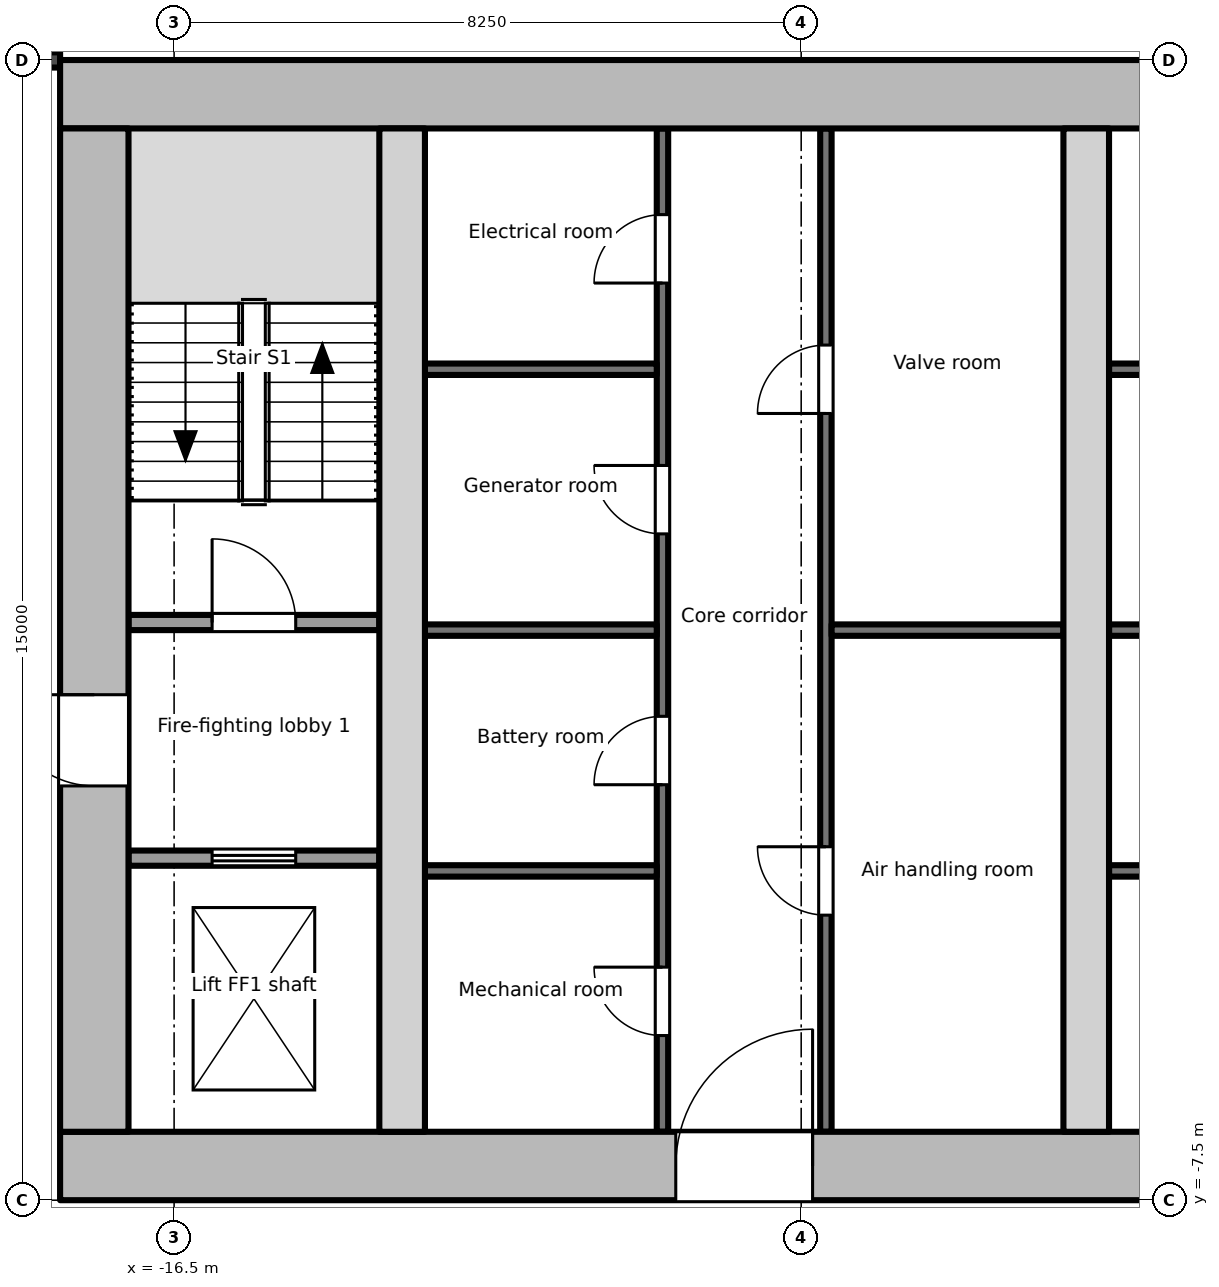
"""IFC4 building model, lengths in metres.
Left out: names, types, materials, properties, quantities, classifications, styles, units other than length and angle.
Written with IfcOpenShell. Run it as: python <this file> out.ifc"""

import sys

from ifc_helpers import new_model, si_unit, direction, frame, frame_2d, origin, place, context, subcontext, project, spatial, rectangle, extrude, element, fill, save


model = new_model("IFC4")
c1 = context("Model", 3, precision=1e-05, world=origin(), true_north=direction((0.0, 1.0)))
c2 = subcontext(c1, "Body", "Model", "MODEL_VIEW")
j1 = project(units=[si_unit("LENGTHUNIT", "METRE"), si_unit("PLANEANGLEUNIT", "RADIAN")], contexts=[c1])
p1 = place(None, origin())
s1 = spatial("IfcSite", under=j1, at=p1, CompositionType="ELEMENT")
p2 = place(p1, origin())
s2 = spatial("IfcBuilding", under=s1, at=p2, CompositionType="ELEMENT")
p3 = place(p2, frame((0.0, 0.0, 308.3)))
s3 = spatial("IfcBuildingStorey", under=s2, at=p3, CompositionType="ELEMENT", Elevation=308.3)
p4 = place(p3, frame((-18.0, -7.05, -0.2), z_axis=(0.0, 0.0, 1.0), x_axis=(1.0, 0.0, 0.0)))
e1 = element("IfcWall", 1, at=p4, inside=s3, PredefinedType="SHEAR", context=c2, shape_type="SweptSolid", body=[
    extrude(rectangle(XDim=36.0, YDim=0.9, at=frame_2d((18.0, 0.0))), origin(), (0.0, 0.0, 1.0), 4.0),
])
p5 = place(p4, frame((8.1, 0.0, 0.2)))
e2 = element("IfcOpeningElement", 2, at=p5, cuts=e1, PredefinedType="OPENING", context=c2, shape_type="SweptSolid", body=[
    extrude(rectangle(XDim=1.8, YDim=2.1, at=frame_2d((0.9, 1.05))), frame((0.0, 0.46, 0.0), z_axis=(0.0, -1.0, 0.0), x_axis=(1.0, 0.0, 0.0)), (0.0, 0.0, 1.0), 0.921),
])
p6 = place(p4, frame((17.1, 0.0, 0.2)))
e3 = element("IfcOpeningElement", 3, at=p6, cuts=e1, PredefinedType="OPENING", context=c2, shape_type="SweptSolid", body=[
    extrude(rectangle(XDim=1.8, YDim=2.1, at=frame_2d((0.9, 1.05))), frame((0.0, 0.46, 0.0), z_axis=(0.0, -1.0, 0.0), x_axis=(1.0, 0.0, 0.0)), (0.0, 0.0, 1.0), 0.921),
])
p7 = place(p4, frame((26.1, 0.0, 0.2)))
e4 = element("IfcOpeningElement", 4, at=p7, cuts=e1, PredefinedType="OPENING", context=c2, shape_type="SweptSolid", body=[
    extrude(rectangle(XDim=1.8, YDim=2.1, at=frame_2d((0.9, 1.05))), frame((0.0, 0.46, 0.0), z_axis=(0.0, -1.0, 0.0), x_axis=(1.0, 0.0, 0.0)), (0.0, 0.0, 1.0), 0.921),
])
p8 = place(p3, frame((-18.0, 7.05, -0.2), z_axis=(0.0, 0.0, 1.0), x_axis=(1.0, 0.0, 0.0)))
e5 = element("IfcWall", 5, at=p8, inside=s3, PredefinedType="SHEAR", context=c2, shape_type="SweptSolid", body=[
    extrude(rectangle(XDim=36.0, YDim=0.9, at=frame_2d((18.0, 0.0))), origin(), (0.0, 0.0, 1.0), 4.0),
])
p9 = place(p3, frame((-17.55, -6.6, -0.2), z_axis=(0.0, 0.0, 1.0), x_axis=(0.0, 1.0, 0.0)))
e6 = element("IfcWall", 6, at=p9, inside=s3, PredefinedType="SHEAR", context=c2, shape_type="SweptSolid", body=[
    extrude(rectangle(XDim=13.2, YDim=0.9, at=frame_2d((6.6, 0.0))), origin(), (0.0, 0.0, 1.0), 4.0),
])
p10 = place(p9, frame((4.55, 0.0, 0.2)))
e7 = element("IfcOpeningElement", 7, at=p10, cuts=e6, PredefinedType="OPENING", context=c2, shape_type="SweptSolid", body=[
    extrude(rectangle(XDim=1.2, YDim=2.1, at=frame_2d((0.6, 1.05))), frame((0.0, 0.46, 0.0), z_axis=(0.0, -1.0, 0.0), x_axis=(1.0, 0.0, 0.0)), (0.0, 0.0, 1.0), 0.921),
])
for number, where, z_axis, x_axis in (
    (8, (-13.5, -6.6, -0.2), (0.0, 0.0, 1.0), (0.0, 1.0, 0.0)),
    (9, (-4.5, -6.6, -0.2), (0.0, 0.0, 1.0), (0.0, 1.0, 0.0)),
):
    element("IfcWall", number, at=place(p3, frame(where, z_axis=z_axis, x_axis=x_axis)), inside=s3, PredefinedType="SHEAR", context=c2, shape_type="SweptSolid", body=[
        extrude(rectangle(XDim=13.2, YDim=0.6, at=frame_2d((6.6, 0.0))), origin(), (0.0, 0.0, 1.0), 4.0),
    ])
p11 = place(p3, frame((-17.1, -3.0, 0.0), z_axis=(0.0, 0.0, 1.0), x_axis=(1.0, 0.0, 0.0)))
e10 = element("IfcWall", 10, at=p11, inside=s3, PredefinedType="PARTITIONING", context=c2, shape_type="SweptSolid", body=[
    extrude(rectangle(XDim=3.3, YDim=0.2, at=frame_2d((1.65, 0.0))), origin(), (0.0, 0.0, 1.0), 3.8),
])
p12 = place(p11, frame((1.1, 0.0, 0.0)))
e11 = element("IfcOpeningElement", 11, at=p12, cuts=e10, PredefinedType="OPENING", context=c2, shape_type="SweptSolid", body=[
    extrude(rectangle(XDim=1.1, YDim=2.1, at=frame_2d((0.55, 1.05))), frame((0.0, 0.111, 0.0), z_axis=(0.0, -1.0, 0.0), x_axis=(1.0, 0.0, 0.0)), (0.0, 0.0, 1.0), 0.221),
])
p13 = place(p3, frame((-17.1, 0.1, 0.0), z_axis=(0.0, 0.0, 1.0), x_axis=(1.0, 0.0, 0.0)))
e12 = element("IfcWall", 12, at=p13, inside=s3, PredefinedType="PARTITIONING", context=c2, shape_type="SweptSolid", body=[
    extrude(rectangle(XDim=3.3, YDim=0.2, at=frame_2d((1.65, 0.0))), origin(), (0.0, 0.0, 1.0), 3.8),
])
p14 = place(p13, frame((1.1, 0.0, 0.0)))
e13 = element("IfcOpeningElement", 13, at=p14, cuts=e12, PredefinedType="OPENING", context=c2, shape_type="SweptSolid", body=[
    extrude(rectangle(XDim=1.1, YDim=2.1, at=frame_2d((0.55, 1.05))), frame((0.0, 0.111, 0.0), z_axis=(0.0, -1.0, 0.0), x_axis=(1.0, 0.0, 0.0)), (0.0, 0.0, 1.0), 0.221),
])
p15 = place(p3, frame((-10.075, -6.6, 0.0), z_axis=(0.0, 0.0, 1.0), x_axis=(0.0, 1.0, 0.0)))
e14 = element("IfcWall", 14, at=p15, inside=s3, PredefinedType="PARTITIONING", context=c2, shape_type="SweptSolid", body=[
    extrude(rectangle(XDim=13.2, YDim=0.15, at=frame_2d((6.6, 0.0))), origin(), (0.0, 0.0, 1.0), 3.8),
])
p16 = place(p15, frame((1.266, 0.0, 0.0)))
e15 = element("IfcOpeningElement", 15, at=p16, cuts=e14, PredefinedType="OPENING", context=c2, shape_type="SweptSolid", body=[
    extrude(rectangle(XDim=0.9, YDim=2.1, at=frame_2d((0.45, 1.05))), frame((0.0, 0.085, 0.0), z_axis=(0.0, -1.0, 0.0), x_axis=(1.0, 0.0, 0.0)), (0.0, 0.0, 1.0), 0.171),
])
p17 = place(p15, frame((4.566, 0.0, 0.0)))
e16 = element("IfcOpeningElement", 16, at=p17, cuts=e14, PredefinedType="OPENING", context=c2, shape_type="SweptSolid", body=[
    extrude(rectangle(XDim=0.9, YDim=2.1, at=frame_2d((0.45, 1.05))), frame((0.0, 0.085, 0.0), z_axis=(0.0, -1.0, 0.0), x_axis=(1.0, 0.0, 0.0)), (0.0, 0.0, 1.0), 0.171),
])
p18 = place(p15, frame((7.866, 0.0, 0.0)))
e17 = element("IfcOpeningElement", 17, at=p18, cuts=e14, PredefinedType="OPENING", context=c2, shape_type="SweptSolid", body=[
    extrude(rectangle(XDim=0.9, YDim=2.1, at=frame_2d((0.45, 1.05))), frame((0.0, 0.085, 0.0), z_axis=(0.0, -1.0, 0.0), x_axis=(1.0, 0.0, 0.0)), (0.0, 0.0, 1.0), 0.171),
])
p19 = place(p15, frame((11.166, 0.0, 0.0)))
e18 = element("IfcOpeningElement", 18, at=p19, cuts=e14, PredefinedType="OPENING", context=c2, shape_type="SweptSolid", body=[
    extrude(rectangle(XDim=0.9, YDim=2.1, at=frame_2d((0.45, 1.05))), frame((0.0, 0.085, 0.0), z_axis=(0.0, -1.0, 0.0), x_axis=(1.0, 0.0, 0.0)), (0.0, 0.0, 1.0), 0.171),
])
for number, where, z_axis, x_axis in (
    (19, (-13.2, -3.168, 0.0), (0.0, 0.0, 1.0), (1.0, 0.0, 0.0)),
    (20, (-13.2, 0.0, 0.0), (0.0, 0.0, 1.0), (1.0, 0.0, 0.0)),
    (21, (-13.2, 3.432, 0.0), (0.0, 0.0, 1.0), (1.0, 0.0, 0.0)),
):
    element("IfcWall", number, at=place(p3, frame(where, z_axis=z_axis, x_axis=x_axis)), inside=s3, PredefinedType="PARTITIONING", context=c2, shape_type="SweptSolid", body=[
        extrude(rectangle(XDim=3.05, YDim=0.15, at=frame_2d((1.525, 0.0))), origin(), (0.0, 0.0, 1.0), 3.8),
    ])
p20 = place(p3, frame((-7.925, -6.6, 0.0), z_axis=(0.0, 0.0, 1.0), x_axis=(0.0, 1.0, 0.0)))
e22 = element("IfcWall", 22, at=p20, inside=s3, PredefinedType="PARTITIONING", context=c2, shape_type="SweptSolid", body=[
    extrude(rectangle(XDim=13.2, YDim=0.15, at=frame_2d((6.6, 0.0))), origin(), (0.0, 0.0, 1.0), 3.8),
])
p21 = place(p20, frame((2.85, 0.0, 0.0)))
e23 = element("IfcOpeningElement", 23, at=p21, cuts=e22, PredefinedType="OPENING", context=c2, shape_type="SweptSolid", body=[
    extrude(rectangle(XDim=0.9, YDim=2.1, at=frame_2d((0.45, 1.05))), frame((0.0, 0.085, 0.0), z_axis=(0.0, -1.0, 0.0), x_axis=(1.0, 0.0, 0.0)), (0.0, 0.0, 1.0), 0.171),
])
p22 = place(p20, frame((9.45, 0.0, 0.0)))
e24 = element("IfcOpeningElement", 24, at=p22, cuts=e22, PredefinedType="OPENING", context=c2, shape_type="SweptSolid", body=[
    extrude(rectangle(XDim=0.9, YDim=2.1, at=frame_2d((0.45, 1.05))), frame((0.0, 0.085, 0.0), z_axis=(0.0, -1.0, 0.0), x_axis=(1.0, 0.0, 0.0)), (0.0, 0.0, 1.0), 0.171),
])
for number, where, z_axis, x_axis in (
    (25, (-7.85, 0.0, 0.0), (0.0, 0.0, 1.0), (1.0, 0.0, 0.0)),
    (26, (-4.2, -3.168, 0.0), (0.0, 0.0, 1.0), (1.0, 0.0, 0.0)),
    (27, (-4.2, 0.0, 0.0), (0.0, 0.0, 1.0), (1.0, 0.0, 0.0)),
    (28, (-4.2, 3.432, 0.0), (0.0, 0.0, 1.0), (1.0, 0.0, 0.0)),
):
    element("IfcWall", number, at=place(p3, frame(where, z_axis=z_axis, x_axis=x_axis)), inside=s3, PredefinedType="PARTITIONING", context=c2, shape_type="SweptSolid", body=[
        extrude(rectangle(XDim=3.05, YDim=0.15, at=frame_2d((1.525, 0.0))), origin(), (0.0, 0.0, 1.0), 3.8),
    ])
p23 = place(p3, frame((-20.6, 7.501, 0.0), z_axis=(0.0, 0.0, 1.0), x_axis=(1.0, 0.0, 0.0)))
e29 = element("IfcWall", 29, at=p23, inside=s3, PredefinedType="PARTITIONING", context=c2, shape_type="SweptSolid", body=[
    extrude(rectangle(XDim=2.6, YDim=0.2, at=frame_2d((1.3, 0.0))), origin(), (0.0, 0.0, 1.0), 3.8),
])
p24 = place(p12, origin())
e30 = element("IfcDoor", 30, at=p24, inside=s3, OperationType="DOUBLE_DOOR_SLIDING", PredefinedType="DOOR", context=c2, shape_type="SweptSolid", body=[
    extrude(rectangle(XDim=1.1, YDim=2.1, at=frame_2d((0.55, 1.05))), frame((0.0, 0.025, 0.0), z_axis=(0.0, -1.0, 0.0), x_axis=(1.0, 0.0, 0.0)), (0.0, 0.0, 1.0), 0.05),
])
fill(e11, e30)
p25 = place(p10, origin())
e31 = element("IfcDoor", 31, at=p25, inside=s3, OperationType="SINGLE_SWING_RIGHT", PredefinedType="DOOR", context=c2, shape_type="SweptSolid", body=[
    extrude(rectangle(XDim=1.2, YDim=2.1, at=frame_2d((0.6, 1.05))), frame((0.0, 0.025, 0.0), z_axis=(0.0, -1.0, 0.0), x_axis=(1.0, 0.0, 0.0)), (0.0, 0.0, 1.0), 0.05),
])
fill(e7, e31)
p26 = place(p14, origin())
e32 = element("IfcDoor", 32, at=p26, inside=s3, OperationType="SINGLE_SWING_LEFT", PredefinedType="DOOR", context=c2, shape_type="SweptSolid", body=[
    extrude(rectangle(XDim=1.1, YDim=2.1, at=frame_2d((0.55, 1.05))), frame((0.0, 0.025, 0.0), z_axis=(0.0, -1.0, 0.0), x_axis=(1.0, 0.0, 0.0)), (0.0, 0.0, 1.0), 0.05),
])
fill(e13, e32)
p27 = place(p16, origin())
e33 = element("IfcDoor", 33, at=p27, inside=s3, OperationType="SINGLE_SWING_RIGHT", PredefinedType="DOOR", context=c2, shape_type="SweptSolid", body=[
    extrude(rectangle(XDim=0.9, YDim=2.1, at=frame_2d((0.45, 1.05))), frame((0.0, 0.025, 0.0), z_axis=(0.0, -1.0, 0.0), x_axis=(1.0, 0.0, 0.0)), (0.0, 0.0, 1.0), 0.05),
])
fill(e15, e33)
p28 = place(p17, origin())
e34 = element("IfcDoor", 34, at=p28, inside=s3, OperationType="SINGLE_SWING_LEFT", PredefinedType="DOOR", context=c2, shape_type="SweptSolid", body=[
    extrude(rectangle(XDim=0.9, YDim=2.1, at=frame_2d((0.45, 1.05))), frame((0.0, 0.025, 0.0), z_axis=(0.0, -1.0, 0.0), x_axis=(1.0, 0.0, 0.0)), (0.0, 0.0, 1.0), 0.05),
])
fill(e16, e34)
p29 = place(p18, origin())
e35 = element("IfcDoor", 35, at=p29, inside=s3, OperationType="SINGLE_SWING_RIGHT", PredefinedType="DOOR", context=c2, shape_type="SweptSolid", body=[
    extrude(rectangle(XDim=0.9, YDim=2.1, at=frame_2d((0.45, 1.05))), frame((0.0, 0.025, 0.0), z_axis=(0.0, -1.0, 0.0), x_axis=(1.0, 0.0, 0.0)), (0.0, 0.0, 1.0), 0.05),
])
fill(e17, e35)
p30 = place(p19, origin())
e36 = element("IfcDoor", 36, at=p30, inside=s3, OperationType="SINGLE_SWING_LEFT", PredefinedType="DOOR", context=c2, shape_type="SweptSolid", body=[
    extrude(rectangle(XDim=0.9, YDim=2.1, at=frame_2d((0.45, 1.05))), frame((0.0, 0.025, 0.0), z_axis=(0.0, -1.0, 0.0), x_axis=(1.0, 0.0, 0.0)), (0.0, 0.0, 1.0), 0.05),
])
fill(e18, e36)
p31 = place(p21, origin())
e37 = element("IfcDoor", 37, at=p31, inside=s3, OperationType="SINGLE_SWING_RIGHT", PredefinedType="DOOR", context=c2, shape_type="SweptSolid", body=[
    extrude(rectangle(XDim=0.9, YDim=2.1, at=frame_2d((0.45, 1.05))), frame((0.0, 0.025, 0.0), z_axis=(0.0, -1.0, 0.0), x_axis=(1.0, 0.0, 0.0)), (0.0, 0.0, 1.0), 0.05),
])
fill(e23, e37)
p32 = place(p22, origin())
e38 = element("IfcDoor", 38, at=p32, inside=s3, OperationType="SINGLE_SWING_LEFT", PredefinedType="DOOR", context=c2, shape_type="SweptSolid", body=[
    extrude(rectangle(XDim=0.9, YDim=2.1, at=frame_2d((0.45, 1.05))), frame((0.0, 0.025, 0.0), z_axis=(0.0, -1.0, 0.0), x_axis=(1.0, 0.0, 0.0)), (0.0, 0.0, 1.0), 0.05),
])
fill(e24, e38)
p33 = place(p5, origin())
e39 = element("IfcDoor", 39, at=p33, inside=s3, OperationType="SINGLE_SWING_RIGHT", PredefinedType="DOOR", context=c2, shape_type="SweptSolid", body=[
    extrude(rectangle(XDim=1.8, YDim=2.1, at=frame_2d((0.9, 1.05))), frame((0.0, 0.025, 0.0), z_axis=(0.0, -1.0, 0.0), x_axis=(1.0, 0.0, 0.0)), (0.0, 0.0, 1.0), 0.05),
])
fill(e2, e39)
save(model, sys.argv[1])
